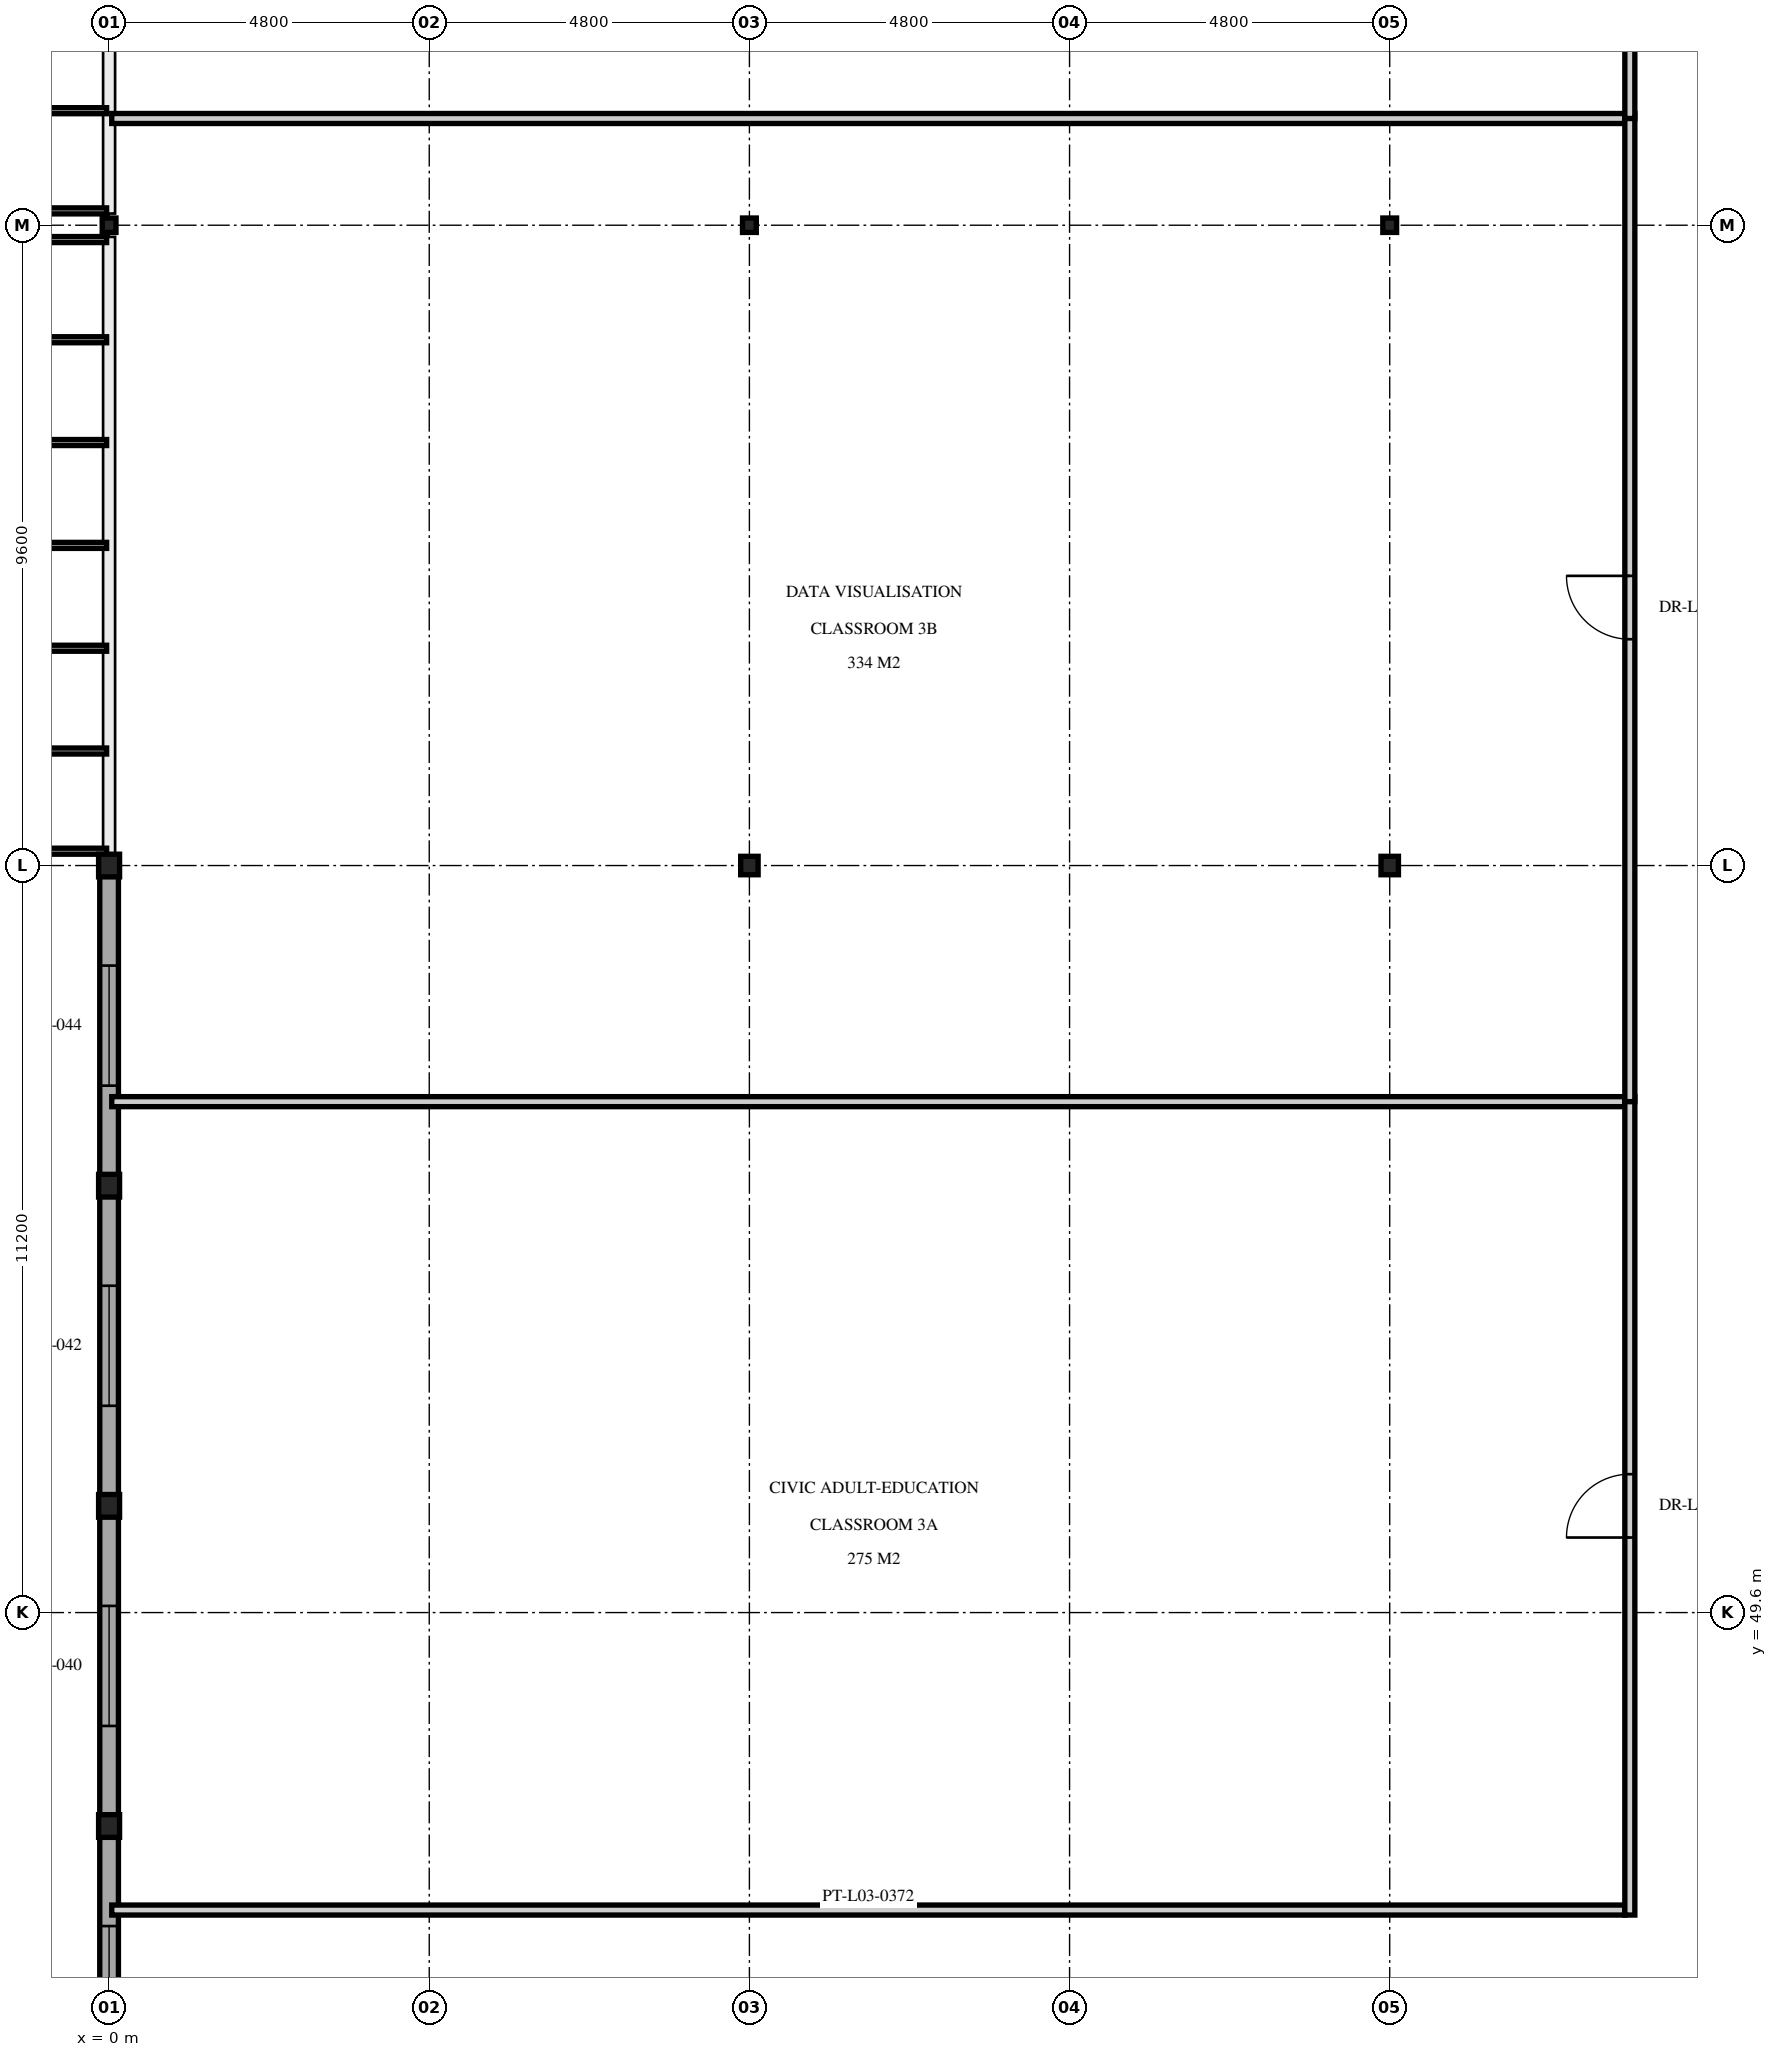
"""IFC4 building model, lengths in metres.
Left out: names, types, materials, properties, quantities, classifications, styles, units other than length and angle.
Written with IfcOpenShell. Run it as: python <this file> out.ifc"""

import sys

from ifc_helpers import new_model, si_unit, direction, frame, frame_2d, origin, origin_2d, place, context, subcontext, project, spatial, rectangle, i_section, extrude, element, fill, save


model = new_model("IFC4")
c1 = context("Model", 3, precision=1e-05, world=origin(), true_north=direction((0.0, 1.0)))
c2 = subcontext(c1, "Body", "Model", "MODEL_VIEW")
j1 = project(units=[si_unit("LENGTHUNIT", "METRE"), si_unit("PLANEANGLEUNIT", "RADIAN")], contexts=[c1])
p1 = place(None, origin())
s1 = spatial("IfcSite", under=j1, at=p1, CompositionType="ELEMENT")
p2 = place(p1, origin())
s2 = spatial("IfcBuilding", under=s1, at=p2, CompositionType="ELEMENT")
p3 = place(p2, frame((0.0, 0.0, 14.1)))
s3 = spatial("IfcBuildingStorey", under=s2, at=p3, CompositionType="ELEMENT", Elevation=14.1)
p4 = place(p3, frame((0.0, 46.4, 0.0), z_axis=(0.0, 0.0, 1.0), x_axis=(1.0, 0.0, 0.0)))
e1 = element("IfcColumn", 1, at=p4, inside=s3, PredefinedType="COLUMN", context=c2, shape_type="SweptSolid", body=[
    extrude(i_section(OverallWidth=0.314, OverallDepth=0.34, WebThickness=0.019, FlangeThickness=0.031, at=origin_2d()), origin(), (0.0, 0.0, 1.0), 4.756),
])
for number, where, z_axis, x_axis in (
    (2, (0.0, 51.2, 0.0), (0.0, 0.0, 1.0), (1.0, 0.0, 0.0)),
    (3, (0.0, 56.0, 0.0), (0.0, 0.0, 1.0), (1.0, 0.0, 0.0)),
    (4, (0.0, 60.8, 0.0), (0.0, 0.0, 1.0), (1.0, 0.0, 0.0)),
):
    element("IfcColumn", number, at=place(p3, frame(where, z_axis=z_axis, x_axis=x_axis)), inside=s3, PredefinedType="COLUMN", context=c2, shape_type="SweptSolid", body=[
        extrude(i_section(OverallWidth=0.314, OverallDepth=0.34, WebThickness=0.019, FlangeThickness=0.031, at=origin_2d()), origin(), (0.0, 0.0, 1.0), 4.5),
    ])
for number, where, z_axis, x_axis in (
    (5, (9.6, 60.8, 0.0), (0.0, 0.0, 1.0), (1.0, 0.0, 0.0)),
    (6, (19.2, 60.8, 0.0), (0.0, 0.0, 1.0), (1.0, 0.0, 0.0)),
):
    element("IfcColumn", number, at=place(p3, frame(where, z_axis=z_axis, x_axis=x_axis)), inside=s3, PredefinedType="COLUMN", context=c2, shape_type="SweptSolid", body=[
        extrude(i_section(OverallWidth=0.261, OverallDepth=0.276, WebThickness=0.015, FlangeThickness=0.025, at=origin_2d()), origin(), (0.0, 0.0, 1.0), 4.5),
    ])
for number, where, z_axis, x_axis in (
    (7, (0.0, 70.4, 0.0), (0.0, 0.0, 1.0), (1.0, 0.0, 0.0)),
    (8, (9.6, 70.4, 0.0), (0.0, 0.0, 1.0), (1.0, 0.0, 0.0)),
    (9, (19.2, 70.4, 0.0), (0.0, 0.0, 1.0), (1.0, 0.0, 0.0)),
):
    element("IfcColumn", number, at=place(p3, frame(where, z_axis=z_axis, x_axis=x_axis)), inside=s3, PredefinedType="COLUMN", context=c2, shape_type="SweptSolid", body=[
        extrude(i_section(OverallWidth=0.206, OverallDepth=0.216, WebThickness=0.01, FlangeThickness=0.017, at=origin_2d()), origin(), (0.0, 0.0, 1.0), 4.5),
    ])
p5 = place(p3, frame((0.0, 41.515, 0.0), z_axis=(0.0, 0.0, 1.0), x_axis=(0.0, 1.0, 0.0)))
e10 = element("IfcWall", 10, at=p5, inside=s3, PredefinedType="SOLIDWALL", context=c2, shape_type="SweptSolid", body=[
    extrude(rectangle(XDim=4.97, YDim=0.28, at=frame_2d((2.485, 0.0))), origin(), (0.0, 0.0, 1.0), 3.482),
])
p6 = place(p5, frame((1.585, 0.0, 1.0)))
e11 = element("IfcOpeningElement", 11, at=p6, cuts=e10, PredefinedType="OPENING", context=c2, shape_type="SweptSolid", body=[
    extrude(rectangle(XDim=1.8, YDim=2.1, at=frame_2d((0.9, 1.05))), frame((0.0, 0.15, 0.0), z_axis=(0.0, -1.0, 0.0), x_axis=(1.0, 0.0, 0.0)), (0.0, 0.0, 1.0), 0.3),
])
p7 = place(p3, frame((0.0, 46.315, 0.0), z_axis=(0.0, 0.0, 1.0), x_axis=(0.0, 1.0, 0.0)))
e12 = element("IfcWall", 12, at=p7, inside=s3, PredefinedType="SOLIDWALL", context=c2, shape_type="SweptSolid", body=[
    extrude(rectangle(XDim=4.97, YDim=0.28, at=frame_2d((2.485, 0.0))), origin(), (0.0, 0.0, 1.0), 3.482),
])
p8 = place(p7, frame((1.585, 0.0, 1.0)))
e13 = element("IfcOpeningElement", 13, at=p8, cuts=e12, PredefinedType="OPENING", context=c2, shape_type="SweptSolid", body=[
    extrude(rectangle(XDim=1.8, YDim=2.1, at=frame_2d((0.9, 1.05))), frame((0.0, 0.15, 0.0), z_axis=(0.0, -1.0, 0.0), x_axis=(1.0, 0.0, 0.0)), (0.0, 0.0, 1.0), 0.3),
])
p9 = place(p3, frame((0.0, 51.115, 0.0), z_axis=(0.0, 0.0, 1.0), x_axis=(0.0, 1.0, 0.0)))
e14 = element("IfcWall", 14, at=p9, inside=s3, PredefinedType="SOLIDWALL", context=c2, shape_type="SweptSolid", body=[
    extrude(rectangle(XDim=4.97, YDim=0.28, at=frame_2d((2.485, 0.0))), origin(), (0.0, 0.0, 1.0), 3.482),
])
p10 = place(p9, frame((1.585, 0.0, 1.0)))
e15 = element("IfcOpeningElement", 15, at=p10, cuts=e14, PredefinedType="OPENING", context=c2, shape_type="SweptSolid", body=[
    extrude(rectangle(XDim=1.8, YDim=2.1, at=frame_2d((0.9, 1.05))), frame((0.0, 0.15, 0.0), z_axis=(0.0, -1.0, 0.0), x_axis=(1.0, 0.0, 0.0)), (0.0, 0.0, 1.0), 0.3),
])
p11 = place(p3, frame((0.0, 55.915, 0.0), z_axis=(0.0, 0.0, 1.0), x_axis=(0.0, 1.0, 0.0)))
e16 = element("IfcWall", 16, at=p11, inside=s3, PredefinedType="SOLIDWALL", context=c2, shape_type="SweptSolid", body=[
    extrude(rectangle(XDim=4.97, YDim=0.28, at=frame_2d((2.485, 0.0))), origin(), (0.0, 0.0, 1.0), 3.482),
])
p12 = place(p11, frame((1.585, 0.0, 1.0)))
e17 = element("IfcOpeningElement", 17, at=p12, cuts=e16, PredefinedType="OPENING", context=c2, shape_type="SweptSolid", body=[
    extrude(rectangle(XDim=1.8, YDim=2.1, at=frame_2d((0.9, 1.05))), frame((0.0, 0.15, 0.0), z_axis=(0.0, -1.0, 0.0), x_axis=(1.0, 0.0, 0.0)), (0.0, 0.0, 1.0), 0.3),
])
for number, where, z_axis, x_axis in (
    (18, (0.04, 45.14, 0.0), (0.0, 0.0, 1.0), (1.0, 0.0, 0.0)),
    (19, (0.04, 57.26, 0.0), (0.0, 0.0, 1.0), (1.0, 0.0, 0.0)),
):
    element("IfcWall", number, at=place(p3, frame(where, z_axis=z_axis, x_axis=x_axis)), inside=s3, PredefinedType="PARTITIONING", context=c2, shape_type="SweptSolid", body=[
        extrude(rectangle(XDim=22.685, YDim=0.15, at=frame_2d((11.343, 0.0))), origin(), (0.0, 0.0, 1.0), 3.475),
    ])
p13 = place(p3, frame((22.8, 45.065, 0.0), z_axis=(0.0, 0.0, 1.0), x_axis=(0.0, 1.0, 0.0)))
e20 = element("IfcWall", 20, at=p13, inside=s3, PredefinedType="PARTITIONING", context=c2, shape_type="SweptSolid", body=[
    extrude(rectangle(XDim=12.27, YDim=0.15, at=frame_2d((6.135, 0.0))), origin(), (0.0, 0.0, 1.0), 4.929),
])
p14 = place(p13, frame((5.66, 0.0, 0.0)))
e21 = element("IfcOpeningElement", 21, at=p14, cuts=e20, PredefinedType="OPENING", context=c2, shape_type="SweptSolid", body=[
    extrude(rectangle(XDim=0.95, YDim=2.15, at=frame_2d((0.475, 1.075))), frame((0.0, 0.085, 0.0), z_axis=(0.0, -1.0, 0.0), x_axis=(1.0, 0.0, 0.0)), (0.0, 0.0, 1.0), 0.17),
])
p15 = place(p3, frame((0.04, 72.0, 0.0), z_axis=(0.0, 0.0, 1.0), x_axis=(1.0, 0.0, 0.0)))
e22 = element("IfcWall", 22, at=p15, inside=s3, PredefinedType="PARTITIONING", context=c2, shape_type="SweptSolid", body=[
    extrude(rectangle(XDim=22.685, YDim=0.15, at=frame_2d((11.343, 0.0))), origin(), (0.0, 0.0, 1.0), 3.475),
])
p16 = place(p3, frame((22.8, 57.26, 0.0), z_axis=(0.0, 0.0, 1.0), x_axis=(0.0, 1.0, 0.0)))
e23 = element("IfcWall", 23, at=p16, inside=s3, PredefinedType="PARTITIONING", context=c2, shape_type="SweptSolid", body=[
    extrude(rectangle(XDim=14.815, YDim=0.15, at=frame_2d((7.407, 0.0))), origin(), (0.0, 0.0, 1.0), 7.368),
])
p17 = place(p16, frame((6.933, 0.0, 0.0)))
e24 = element("IfcOpeningElement", 24, at=p17, cuts=e23, PredefinedType="OPENING", context=c2, shape_type="SweptSolid", body=[
    extrude(rectangle(XDim=0.95, YDim=2.15, at=frame_2d((0.475, 1.075))), frame((0.0, 0.085, 0.0), z_axis=(0.0, -1.0, 0.0), x_axis=(1.0, 0.0, 0.0)), (0.0, 0.0, 1.0), 0.17),
])
p18 = place(p3, frame((22.8, 72.0, 0.0), z_axis=(0.0, 0.0, 1.0), x_axis=(0.0, 1.0, 0.0)))
e25 = element("IfcWall", 25, at=p18, inside=s3, PredefinedType="PARTITIONING", context=c2, shape_type="SweptSolid", body=[
    extrude(rectangle(XDim=17.56, YDim=0.15, at=frame_2d((8.78, 0.0))), origin(), (0.0, 0.0, 1.0), 10.316),
])
p19 = place(p18, frame((8.305, 0.0, 0.0)))
e26 = element("IfcOpeningElement", 26, at=p19, cuts=e25, PredefinedType="OPENING", context=c2, shape_type="SweptSolid", body=[
    extrude(rectangle(XDim=0.95, YDim=2.15, at=frame_2d((0.475, 1.075))), frame((0.0, 0.085, 0.0), z_axis=(0.0, -1.0, 0.0), x_axis=(1.0, 0.0, 0.0)), (0.0, 0.0, 1.0), 0.17),
])
p20 = place(p6, origin())
e27 = element("IfcWindow", 27, at=p20, inside=s3, PartitioningType="SINGLE_PANEL", PredefinedType="WINDOW", context=c2, shape_type="SweptSolid", body=[
    extrude(rectangle(XDim=1.8, YDim=2.1, at=frame_2d((0.9, 1.05))), frame((0.0, 0.03, 0.0), z_axis=(0.0, -1.0, 0.0), x_axis=(1.0, 0.0, 0.0)), (0.0, 0.0, 1.0), 0.06),
])
fill(e11, e27)
p21 = place(p8, origin())
e28 = element("IfcWindow", 28, at=p21, inside=s3, PartitioningType="SINGLE_PANEL", PredefinedType="WINDOW", context=c2, shape_type="SweptSolid", body=[
    extrude(rectangle(XDim=1.8, YDim=2.1, at=frame_2d((0.9, 1.05))), frame((0.0, 0.03, 0.0), z_axis=(0.0, -1.0, 0.0), x_axis=(1.0, 0.0, 0.0)), (0.0, 0.0, 1.0), 0.06),
])
fill(e13, e28)
p22 = place(p10, origin())
e29 = element("IfcWindow", 29, at=p22, inside=s3, PartitioningType="SINGLE_PANEL", PredefinedType="WINDOW", context=c2, shape_type="SweptSolid", body=[
    extrude(rectangle(XDim=1.8, YDim=2.1, at=frame_2d((0.9, 1.05))), frame((0.0, 0.03, 0.0), z_axis=(0.0, -1.0, 0.0), x_axis=(1.0, 0.0, 0.0)), (0.0, 0.0, 1.0), 0.06),
])
fill(e15, e29)
p23 = place(p12, origin())
e30 = element("IfcWindow", 30, at=p23, inside=s3, PartitioningType="SINGLE_PANEL", PredefinedType="WINDOW", context=c2, shape_type="SweptSolid", body=[
    extrude(rectangle(XDim=1.8, YDim=2.1, at=frame_2d((0.9, 1.05))), frame((0.0, 0.03, 0.0), z_axis=(0.0, -1.0, 0.0), x_axis=(1.0, 0.0, 0.0)), (0.0, 0.0, 1.0), 0.06),
])
fill(e17, e30)
p24 = place(p14, origin())
e31 = element("IfcDoor", 31, at=p24, inside=s3, OperationType="SINGLE_SWING_LEFT", PredefinedType="DOOR", context=c2, shape_type="SweptSolid", body=[
    extrude(rectangle(XDim=0.95, YDim=2.15, at=frame_2d((0.475, 1.075))), frame((0.0, 0.025, 0.0), z_axis=(0.0, -1.0, 0.0), x_axis=(1.0, 0.0, 0.0)), (0.0, 0.0, 1.0), 0.05),
])
fill(e21, e31)
p25 = place(p17, origin())
e32 = element("IfcDoor", 32, at=p25, inside=s3, OperationType="SINGLE_SWING_RIGHT", PredefinedType="DOOR", context=c2, shape_type="SweptSolid", body=[
    extrude(rectangle(XDim=0.95, YDim=2.15, at=frame_2d((0.475, 1.075))), frame((0.0, 0.025, 0.0), z_axis=(0.0, -1.0, 0.0), x_axis=(1.0, 0.0, 0.0)), (0.0, 0.0, 1.0), 0.05),
])
fill(e24, e32)
save(model, sys.argv[1])
